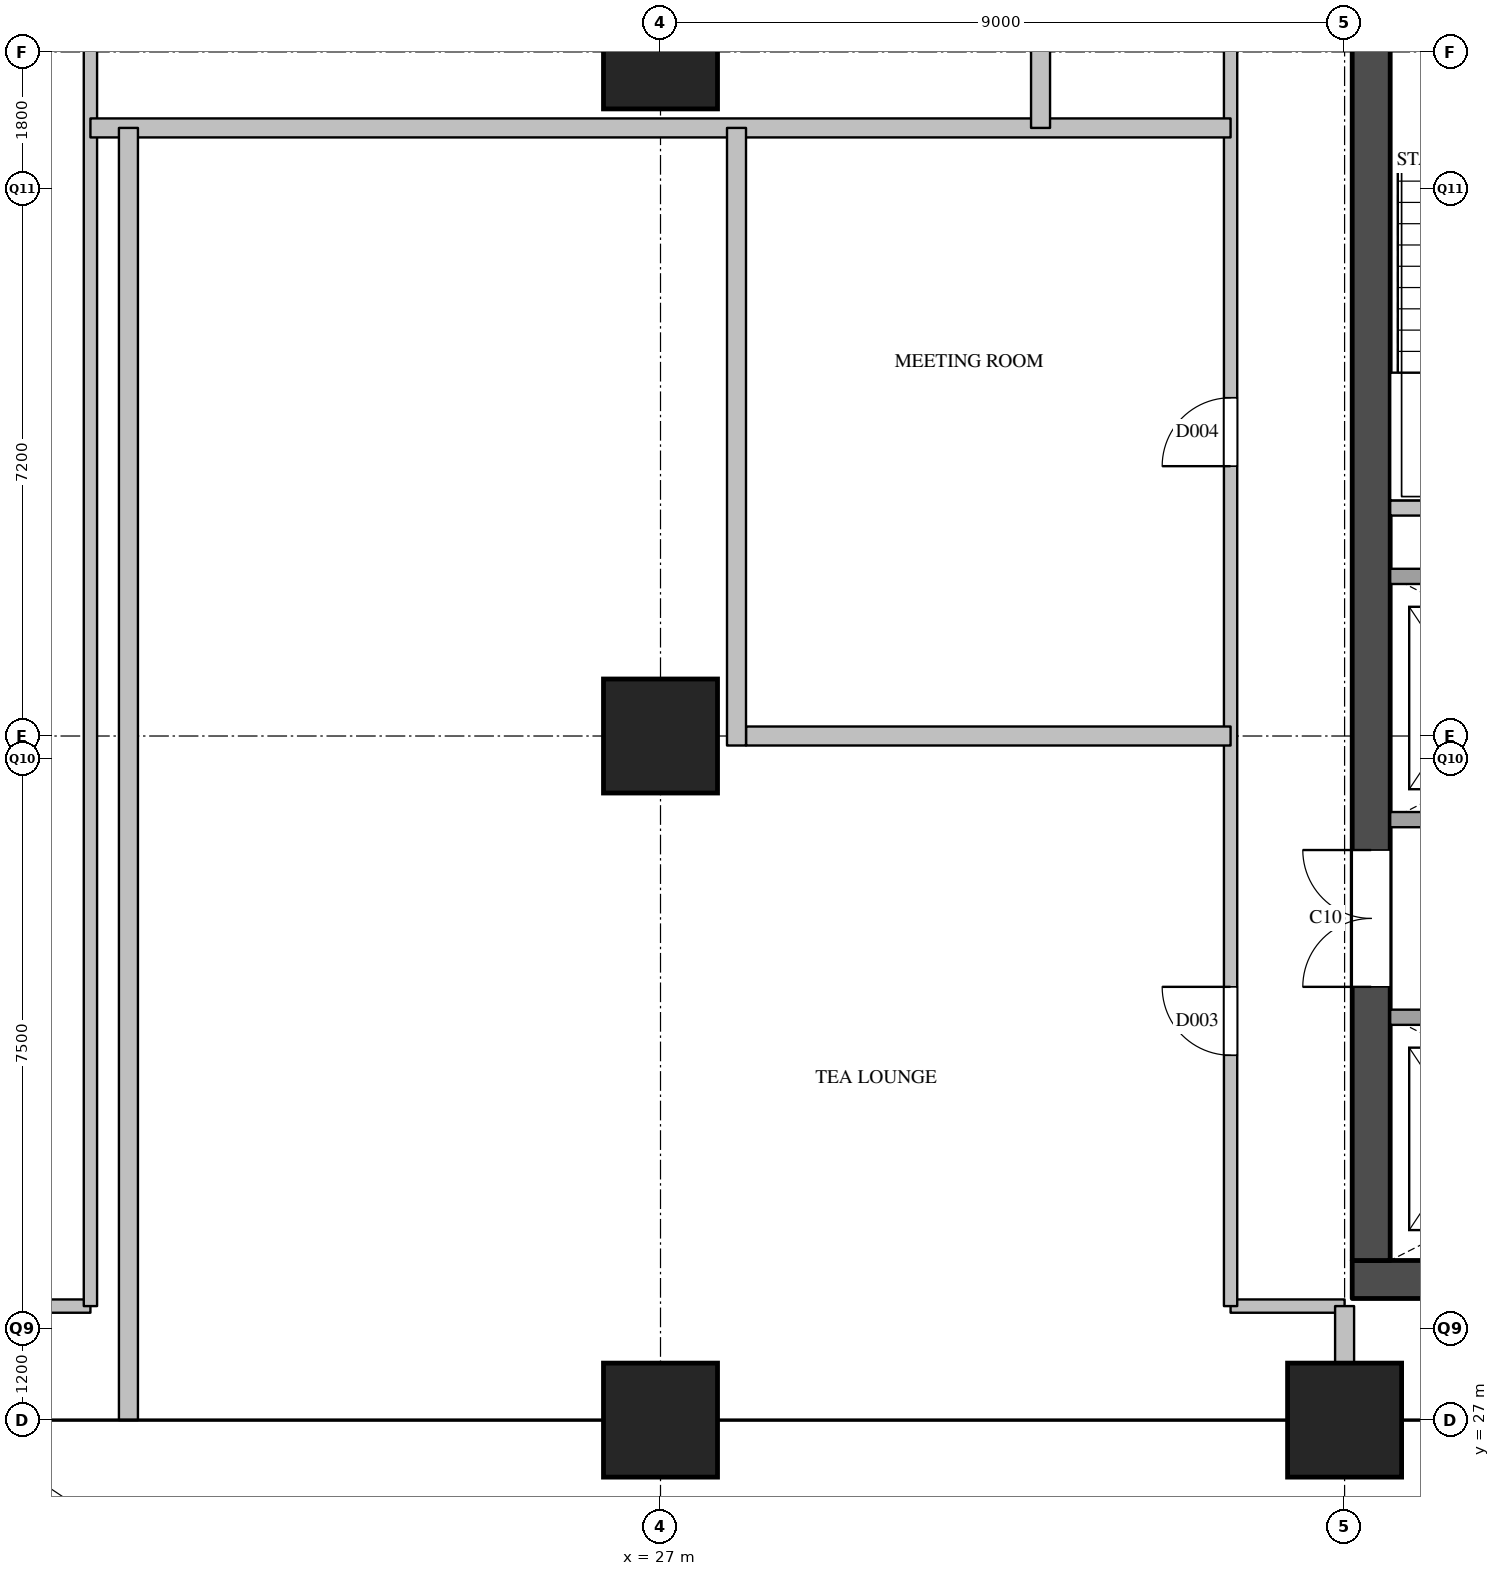
"""IFC4 building model, lengths in metres.
Left out: names, types, materials, properties, quantities, classifications, styles, units other than length and angle.
Written with IfcOpenShell. Run it as: python <this file> out.ifc"""

import sys

from ifc_helpers import new_model, si_unit, direction, frame, frame_2d, origin, origin_2d, place, context, subcontext, project, spatial, rectangle, extrude, element, fill, save


model = new_model("IFC4")
c1 = context("Model", 3, precision=1e-05, world=origin(), true_north=direction((0.0, 1.0)))
c2 = subcontext(c1, "Body", "Model", "MODEL_VIEW")
j1 = project(units=[si_unit("LENGTHUNIT", "METRE"), si_unit("PLANEANGLEUNIT", "RADIAN")], contexts=[c1])
p1 = place(None, origin())
s1 = spatial("IfcSite", under=j1, at=p1, CompositionType="ELEMENT")
p2 = place(p1, origin())
s2 = spatial("IfcBuilding", under=s1, at=p2, CompositionType="ELEMENT")
p3 = place(p2, frame((0.0, 0.0, 138.8)))
s3 = spatial("IfcBuildingStorey", under=s2, at=p3, CompositionType="ELEMENT", Elevation=138.8)
for number, where, z_axis, x_axis in (
    (1, (27.0, 27.0, 0.0), (0.0, 0.0, 1.0), (1.0, 0.0, 0.0)),
    (2, (27.0, 36.0, 0.0), (0.0, 0.0, 1.0), (1.0, 0.0, 0.0)),
    (3, (27.0, 45.0, 0.0), (0.0, 0.0, 1.0), (1.0, 0.0, 0.0)),
    (4, (36.0, 27.0, 0.0), (0.0, 0.0, 1.0), (1.0, 0.0, 0.0)),
):
    element("IfcColumn", number, at=place(p3, frame(where, z_axis=z_axis, x_axis=x_axis)), inside=s3, PredefinedType="COLUMN", context=c2, shape_type="SweptSolid", body=[
        extrude(rectangle(XDim=1.5, YDim=1.5, at=origin_2d()), origin(), (0.0, 0.0, 1.0), 3.9),
    ])
p4 = place(p3, frame((36.1, 28.85, 0.0), z_axis=(0.0, 0.0, 1.0), x_axis=(1.0, 0.0, 0.0)))
e5 = element("IfcWall", 5, at=p4, inside=s3, PredefinedType="SHEAR", context=c2, shape_type="SweptSolid", body=[
    extrude(rectangle(XDim=12.2, YDim=0.5, at=frame_2d((6.1, 0.0))), origin(), (0.0, 0.0, 1.0), 3.6),
])
p5 = place(p4, frame((0.95, 0.0, 0.0)))
e6 = element("IfcOpeningElement", 6, at=p5, cuts=e5, PredefinedType="OPENING", context=c2, shape_type="SweptSolid", body=[
    extrude(rectangle(XDim=1.2, YDim=2.1, at=frame_2d((0.6, 1.05))), frame((0.0, 0.26, 0.0), z_axis=(0.0, -1.0, 0.0), x_axis=(1.0, 0.0, 0.0)), (0.0, 0.0, 1.0), 0.52),
])
p6 = place(p4, frame((3.05, 0.0, 0.0)))
e7 = element("IfcOpeningElement", 7, at=p6, cuts=e5, PredefinedType="OPENING", context=c2, shape_type="SweptSolid", body=[
    extrude(rectangle(XDim=1.2, YDim=2.1, at=frame_2d((0.6, 1.05))), frame((0.0, 0.26, 0.0), z_axis=(0.0, -1.0, 0.0), x_axis=(1.0, 0.0, 0.0)), (0.0, 0.0, 1.0), 0.52),
])
p7 = place(p4, frame((5.15, 0.0, 0.0)))
e8 = element("IfcOpeningElement", 8, at=p7, cuts=e5, PredefinedType="OPENING", context=c2, shape_type="SweptSolid", body=[
    extrude(rectangle(XDim=1.2, YDim=2.1, at=frame_2d((0.6, 1.05))), frame((0.0, 0.26, 0.0), z_axis=(0.0, -1.0, 0.0), x_axis=(1.0, 0.0, 0.0)), (0.0, 0.0, 1.0), 0.52),
])
p8 = place(p3, frame((36.35, 29.1, 0.0), z_axis=(0.0, 0.0, 1.0), x_axis=(0.0, 1.0, 0.0)))
e9 = element("IfcWall", 9, at=p8, inside=s3, PredefinedType="SHEAR", context=c2, shape_type="SweptSolid", body=[
    extrude(rectangle(XDim=20.3, YDim=0.5, at=frame_2d((10.15, 0.0))), origin(), (0.0, 0.0, 1.0), 3.6),
])
p9 = place(p8, frame((3.6, 0.0, 0.0)))
e10 = element("IfcOpeningElement", 10, at=p9, cuts=e9, PredefinedType="OPENING", context=c2, shape_type="SweptSolid", body=[
    extrude(rectangle(XDim=1.8, YDim=2.1, at=frame_2d((0.9, 1.05))), frame((0.0, 0.26, 0.0), z_axis=(0.0, -1.0, 0.0), x_axis=(1.0, 0.0, 0.0)), (0.0, 0.0, 1.0), 0.52),
])
p10 = place(p8, frame((16.4, 0.0, 0.0)))
e11 = element("IfcOpeningElement", 11, at=p10, cuts=e9, PredefinedType="OPENING", context=c2, shape_type="SweptSolid", body=[
    extrude(rectangle(XDim=1.0, YDim=2.1, at=frame_2d((0.5, 1.05))), frame((0.0, 0.26, 0.0), z_axis=(0.0, -1.0, 0.0), x_axis=(1.0, 0.0, 0.0)), (0.0, 0.0, 1.0), 0.52),
])
p11 = place(p3, frame((36.6, 32.3, 0.0), z_axis=(0.0, 0.0, 1.0), x_axis=(1.0, 0.0, 0.0)))
e12 = element("IfcWall", 12, at=p11, inside=s3, PredefinedType="SOLIDWALL", context=c2, shape_type="SweptSolid", body=[
    extrude(rectangle(XDim=11.2, YDim=0.2, at=frame_2d((5.6, 0.0))), origin(), (0.0, 0.0, 1.0), 3.6),
])
p12 = place(p11, frame((7.225, 0.0, 0.0)))
e13 = element("IfcOpeningElement", 13, at=p12, cuts=e12, PredefinedType="OPENING", context=c2, shape_type="SweptSolid", body=[
    extrude(rectangle(XDim=1.2, YDim=2.1, at=frame_2d((0.6, 1.05))), frame((0.0, 0.11, 0.0), z_axis=(0.0, -1.0, 0.0), x_axis=(1.0, 0.0, 0.0)), (0.0, 0.0, 1.0), 0.22),
])
p13 = place(p11, frame((9.475, 0.0, 0.0)))
e14 = element("IfcOpeningElement", 14, at=p13, cuts=e12, PredefinedType="OPENING", context=c2, shape_type="SweptSolid", body=[
    extrude(rectangle(XDim=1.2, YDim=2.1, at=frame_2d((0.6, 1.05))), frame((0.0, 0.11, 0.0), z_axis=(0.0, -1.0, 0.0), x_axis=(1.0, 0.0, 0.0)), (0.0, 0.0, 1.0), 0.22),
])
p14 = place(p3, frame((36.6, 34.9, 0.0), z_axis=(0.0, 0.0, 1.0), x_axis=(1.0, 0.0, 0.0)))
e15 = element("IfcWall", 15, at=p14, inside=s3, PredefinedType="SOLIDWALL", context=c2, shape_type="SweptSolid", body=[
    extrude(rectangle(XDim=6.3, YDim=0.2, at=frame_2d((3.15, 0.0))), origin(), (0.0, 0.0, 1.0), 3.6),
])
p15 = place(p3, frame((36.6, 38.1, 0.0), z_axis=(0.0, 0.0, 1.0), x_axis=(1.0, 0.0, 0.0)))
e16 = element("IfcWall", 16, at=p15, inside=s3, PredefinedType="SOLIDWALL", context=c2, shape_type="SweptSolid", body=[
    extrude(rectangle(XDim=6.7, YDim=0.2, at=frame_2d((3.35, 0.0))), origin(), (0.0, 0.0, 1.0), 3.6),
])
p16 = place(p15, frame((0.45, 0.0, 0.0)))
e17 = element("IfcOpeningElement", 17, at=p16, cuts=e16, PredefinedType="OPENING", context=c2, shape_type="SweptSolid", body=[
    extrude(rectangle(XDim=1.2, YDim=2.1, at=frame_2d((0.6, 1.05))), frame((0.0, 0.11, 0.0), z_axis=(0.0, -1.0, 0.0), x_axis=(1.0, 0.0, 0.0)), (0.0, 0.0, 1.0), 0.22),
])
p17 = place(p15, frame((2.55, 0.0, 0.0)))
e18 = element("IfcOpeningElement", 18, at=p17, cuts=e16, PredefinedType="OPENING", context=c2, shape_type="SweptSolid", body=[
    extrude(rectangle(XDim=1.2, YDim=2.1, at=frame_2d((0.6, 1.05))), frame((0.0, 0.11, 0.0), z_axis=(0.0, -1.0, 0.0), x_axis=(1.0, 0.0, 0.0)), (0.0, 0.0, 1.0), 0.22),
])
p18 = place(p15, frame((4.65, 0.0, 0.0)))
e19 = element("IfcOpeningElement", 19, at=p18, cuts=e16, PredefinedType="OPENING", context=c2, shape_type="SweptSolid", body=[
    extrude(rectangle(XDim=1.2, YDim=2.1, at=frame_2d((0.6, 1.05))), frame((0.0, 0.11, 0.0), z_axis=(0.0, -1.0, 0.0), x_axis=(1.0, 0.0, 0.0)), (0.0, 0.0, 1.0), 0.22),
])
p19 = place(p3, frame((36.6, 39.0, 0.0), z_axis=(0.0, 0.0, 1.0), x_axis=(1.0, 0.0, 0.0)))
e20 = element("IfcWall", 20, at=p19, inside=s3, PredefinedType="SOLIDWALL", context=c2, shape_type="SweptSolid", body=[
    extrude(rectangle(XDim=3.25, YDim=0.2, at=frame_2d((1.625, 0.0))), origin(), (0.0, 0.0, 1.0), 3.6),
])
for number, where, z_axis, x_axis in (
    (21, (18.0, 28.5, 0.0), (0.0, 0.0, 1.0), (1.0, 0.0, 0.0)),
    (22, (34.5, 28.5, 0.0), (0.0, 0.0, 1.0), (1.0, 0.0, 0.0)),
):
    element("IfcWall", number, at=place(p3, frame(where, z_axis=z_axis, x_axis=x_axis)), inside=s3, PredefinedType="PARTITIONING", context=c2, shape_type="SweptSolid", body=[
        extrude(rectangle(XDim=1.5, YDim=0.175, at=frame_2d((0.75, 0.0))), origin(), (0.0, 0.0, 1.0), 3.6),
    ])
p20 = place(p3, frame((19.5, 28.5, 0.0), z_axis=(0.0, 0.0, 1.0), x_axis=(0.0, 1.0, 0.0)))
e23 = element("IfcWall", 23, at=p20, inside=s3, PredefinedType="PARTITIONING", context=c2, shape_type="SweptSolid", body=[
    extrude(rectangle(XDim=23.0, YDim=0.175, at=frame_2d((11.5, 0.0))), origin(), (0.0, 0.0, 1.0), 3.6),
])
p21 = place(p3, frame((34.5, 28.5, 0.0), z_axis=(0.0, 0.0, 1.0), x_axis=(0.0, 1.0, 0.0)))
e24 = element("IfcWall", 24, at=p21, inside=s3, PredefinedType="PARTITIONING", context=c2, shape_type="SweptSolid", body=[
    extrude(rectangle(XDim=23.0, YDim=0.175, at=frame_2d((11.5, 0.0))), origin(), (0.0, 0.0, 1.0), 3.6),
])
p22 = place(p21, frame((3.3, 0.0, 0.0)))
e25 = element("IfcOpeningElement", 25, at=p22, cuts=e24, PredefinedType="OPENING", context=c2, shape_type="SweptSolid", body=[
    extrude(rectangle(XDim=0.9, YDim=2.1, at=frame_2d((0.45, 1.05))), frame((0.0, 0.097, 0.0), z_axis=(0.0, -1.0, 0.0), x_axis=(1.0, 0.0, 0.0)), (0.0, 0.0, 1.0), 0.195),
])
p23 = place(p21, frame((11.05, 0.0, 0.0)))
e26 = element("IfcOpeningElement", 26, at=p23, cuts=e24, PredefinedType="OPENING", context=c2, shape_type="SweptSolid", body=[
    extrude(rectangle(XDim=0.9, YDim=2.1, at=frame_2d((0.45, 1.05))), frame((0.0, 0.097, 0.0), z_axis=(0.0, -1.0, 0.0), x_axis=(1.0, 0.0, 0.0)), (0.0, 0.0, 1.0), 0.195),
])
p24 = place(p21, frame((18.8, 0.0, 0.0)))
e27 = element("IfcOpeningElement", 27, at=p24, cuts=e24, PredefinedType="OPENING", context=c2, shape_type="SweptSolid", body=[
    extrude(rectangle(XDim=0.9, YDim=2.1, at=frame_2d((0.45, 1.05))), frame((0.0, 0.097, 0.0), z_axis=(0.0, -1.0, 0.0), x_axis=(1.0, 0.0, 0.0)), (0.0, 0.0, 1.0), 0.195),
])
p25 = place(p3, frame((28.125, 36.0, 0.0), z_axis=(0.0, 0.0, 1.0), x_axis=(1.0, 0.0, 0.0)))
e28 = element("IfcWall", 28, at=p25, inside=s3, PredefinedType="PARTITIONING", context=c2, shape_type="SweptSolid", body=[
    extrude(rectangle(XDim=6.375, YDim=0.25, at=frame_2d((3.188, 0.0))), origin(), (0.0, 0.0, 1.0), 3.6),
])
p26 = place(p3, frame((19.5, 44.0, 0.0), z_axis=(0.0, 0.0, 1.0), x_axis=(1.0, 0.0, 0.0)))
e29 = element("IfcWall", 29, at=p26, inside=s3, PredefinedType="PARTITIONING", context=c2, shape_type="SweptSolid", body=[
    extrude(rectangle(XDim=15.0, YDim=0.25, at=frame_2d((7.5, 0.0))), origin(), (0.0, 0.0, 1.0), 2.6),
])
p27 = place(p3, frame((20.0, 27.0, 0.0), z_axis=(0.0, 0.0, 1.0), x_axis=(0.0, 1.0, 0.0)))
e30 = element("IfcWall", 30, at=p27, inside=s3, PredefinedType="PARTITIONING", context=c2, shape_type="SweptSolid", body=[
    extrude(rectangle(XDim=17.0, YDim=0.25, at=frame_2d((8.5, 0.0))), origin(), (0.0, 0.0, 1.0), 2.6),
])
p28 = place(p3, frame((28.0, 35.875, 0.0), z_axis=(0.0, 0.0, 1.0), x_axis=(0.0, 1.0, 0.0)))
e31 = element("IfcWall", 31, at=p28, inside=s3, PredefinedType="PARTITIONING", context=c2, shape_type="SweptSolid", body=[
    extrude(rectangle(XDim=8.125, YDim=0.25, at=frame_2d((4.062, 0.0))), origin(), (0.0, 0.0, 1.0), 3.6),
])
p29 = place(p3, frame((32.0, 44.0, 0.0), z_axis=(0.0, 0.0, 1.0), x_axis=(0.0, 1.0, 0.0)))
e32 = element("IfcWall", 32, at=p29, inside=s3, PredefinedType="PARTITIONING", context=c2, shape_type="SweptSolid", body=[
    extrude(rectangle(XDim=10.0, YDim=0.25, at=frame_2d((5.0, 0.0))), origin(), (0.0, 0.0, 1.0), 2.6),
])
p30 = place(p3, frame((36.0, 27.0, 0.0), z_axis=(0.0, 0.0, 1.0), x_axis=(0.0, 1.0, 0.0)))
e33 = element("IfcWall", 33, at=p30, inside=s3, PredefinedType="PARTITIONING", context=c2, shape_type="SweptSolid", body=[
    extrude(rectangle(XDim=1.5, YDim=0.25, at=frame_2d((0.75, 0.0))), origin(), (0.0, 0.0, 1.0), 3.6),
])
p31 = place(p9, origin())
e34 = element("IfcDoor", 34, at=p31, inside=s3, OperationType="DOUBLE_DOOR_SINGLE_SWING", PredefinedType="DOOR", context=c2, shape_type="SweptSolid", body=[
    extrude(rectangle(XDim=1.8, YDim=2.1, at=frame_2d((0.9, 1.05))), frame((0.0, 0.025, 0.0), z_axis=(0.0, -1.0, 0.0), x_axis=(1.0, 0.0, 0.0)), (0.0, 0.0, 1.0), 0.05),
])
fill(e10, e34)
p32 = place(p22, origin())
e35 = element("IfcDoor", 35, at=p32, inside=s3, OperationType="SINGLE_SWING_RIGHT", PredefinedType="DOOR", context=c2, shape_type="SweptSolid", body=[
    extrude(rectangle(XDim=0.9, YDim=2.1, at=frame_2d((0.45, 1.05))), frame((0.0, 0.025, 0.0), z_axis=(0.0, -1.0, 0.0), x_axis=(1.0, 0.0, 0.0)), (0.0, 0.0, 1.0), 0.05),
])
fill(e25, e35)
p33 = place(p23, origin())
e36 = element("IfcDoor", 36, at=p33, inside=s3, OperationType="SINGLE_SWING_LEFT", PredefinedType="DOOR", context=c2, shape_type="SweptSolid", body=[
    extrude(rectangle(XDim=0.9, YDim=2.1, at=frame_2d((0.45, 1.05))), frame((0.0, 0.025, 0.0), z_axis=(0.0, -1.0, 0.0), x_axis=(1.0, 0.0, 0.0)), (0.0, 0.0, 1.0), 0.05),
])
fill(e26, e36)
save(model, sys.argv[1])
